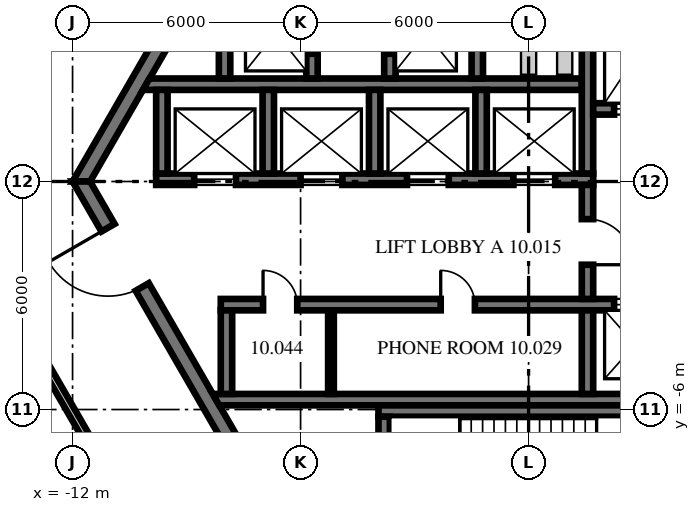
"""IFC4 building model, lengths in metres.
Left out: names, types, materials, properties, quantities, classifications, styles, units other than length and angle.
Written with IfcOpenShell. Run it as: python <this file> out.ifc"""

import sys

from ifc_helpers import new_model, si_unit, direction, frame, frame_2d, origin, place, context, subcontext, project, spatial, polyline, rectangle, outline, extrude, source, transform, mapped, element, fill, save


model = new_model("IFC4")
c1 = context("Model", 3, precision=1e-05, world=origin(), true_north=direction((0.0, 1.0)))
c2 = subcontext(c1, "Body", "Model", "MODEL_VIEW")
j1 = project(units=[si_unit("LENGTHUNIT", "METRE"), si_unit("PLANEANGLEUNIT", "RADIAN")], contexts=[c1])
p1 = place(None, origin())
s1 = spatial("IfcSite", under=j1, at=p1, CompositionType="ELEMENT")
p2 = place(p1, origin())
s2 = spatial("IfcBuilding", under=s1, at=p2, CompositionType="ELEMENT")
p3 = place(p2, frame((0.0, 0.0, 46.1)))
s3 = spatial("IfcBuildingStorey", under=s2, at=p3, CompositionType="ELEMENT", Elevation=46.1)
m1 = source(origin(), c2, "Body", "SweptSolid", [
    extrude(outline(polyline([(-0.115, -0.2), (11.885, -0.2), (11.654, 0.2), (0.115, 0.2), (-0.115, -0.2)])), origin(), (0.0, 0.0, 1.0), 4.1),
])
p4 = place(p3, frame((-5.885, 10.192, 0.0), z_axis=(0.0, 0.0, 1.0), x_axis=(-0.499996592174, -0.866027371285, 0.0)))
e1 = element("IfcWall", 1, at=p4, inside=s3, PredefinedType="SHEAR", context=c2, shape_type="MappedRepresentation", body=[
    mapped(m1, transform((0.0, 0.0, 0.0), scale=1.0)),
])
p5 = place(p4, frame((3.185, 0.0, 0.0)))
e2 = element("IfcOpeningElement", 2, at=p5, cuts=e1, PredefinedType="OPENING", context=c2, shape_type="SweptSolid", body=[
    extrude(rectangle(XDim=1.2, YDim=2.1, at=frame_2d((0.6, 1.05))), frame((0.0, 0.21, 0.0), z_axis=(0.0, -1.0, 0.0), x_axis=(1.0, 0.0, 0.0)), (0.0, 0.0, 1.0), 0.42),
])
p6 = place(p3, frame((-11.769, 0.0, 0.0), z_axis=(0.0, 0.0, 1.0), x_axis=(0.499996592174, -0.866027371285, 0.0)))
e3 = element("IfcWall", 3, at=p6, inside=s3, PredefinedType="SHEAR", context=c2, shape_type="MappedRepresentation", body=[
    mapped(m1, transform((0.0, 0.0, 0.0), scale=1.0)),
])
p7 = place(p6, frame((1.405, 0.0, 0.0)))
e4 = element("IfcOpeningElement", 4, at=p7, cuts=e3, PredefinedType="OPENING", context=c2, shape_type="SweptSolid", body=[
    extrude(rectangle(XDim=1.8, YDim=2.1, at=frame_2d((0.9, 1.05))), frame((0.0, 0.21, 0.0), z_axis=(0.0, -1.0, 0.0), x_axis=(1.0, 0.0, 0.0)), (0.0, 0.0, 1.0), 0.42),
])
p8 = place(p6, frame((7.915, 0.0, 0.0)))
e5 = element("IfcOpeningElement", 5, at=p8, cuts=e3, PredefinedType="OPENING", context=c2, shape_type="SweptSolid", body=[
    extrude(rectangle(XDim=1.2, YDim=2.1, at=frame_2d((0.6, 1.05))), frame((0.0, 0.21, 0.0), z_axis=(0.0, -1.0, 0.0), x_axis=(1.0, 0.0, 0.0)), (0.0, 0.0, 1.0), 0.42),
])
m2 = source(origin(), c2, "Body", "SweptSolid", [
    extrude(rectangle(XDim=11.5, YDim=0.3, at=frame_2d((5.75, 0.0))), origin(), (0.0, 0.0, 1.0), 4.1),
])
p9 = place(p3, frame((-9.8, 0.06, 0.0), z_axis=(0.0, 0.0, 1.0), x_axis=(1.0, 0.0, 0.0)))
e6 = element("IfcWall", 6, at=p9, inside=s3, PredefinedType="SHEAR", context=c2, shape_type="MappedRepresentation", body=[
    mapped(m2, transform((0.0, 0.0, 0.0), scale=1.0)),
])
p10 = place(p9, frame((1.0, 0.0, 0.0)))
e7 = element("IfcOpeningElement", 7, at=p10, cuts=e6, PredefinedType="OPENING", context=c2, shape_type="SweptSolid", body=[
    extrude(rectangle(XDim=1.1, YDim=2.1, at=frame_2d((0.55, 1.05))), frame((0.0, 0.16, 0.0), z_axis=(0.0, -1.0, 0.0), x_axis=(1.0, 0.0, 0.0)), (0.0, 0.0, 1.0), 0.32),
])
p11 = place(p9, frame((3.8, 0.0, 0.0)))
e8 = element("IfcOpeningElement", 8, at=p11, cuts=e6, PredefinedType="OPENING", context=c2, shape_type="SweptSolid", body=[
    extrude(rectangle(XDim=1.1, YDim=2.1, at=frame_2d((0.55, 1.05))), frame((0.0, 0.16, 0.0), z_axis=(0.0, -1.0, 0.0), x_axis=(1.0, 0.0, 0.0)), (0.0, 0.0, 1.0), 0.32),
])
p12 = place(p9, frame((6.6, 0.0, 0.0)))
e9 = element("IfcOpeningElement", 9, at=p12, cuts=e6, PredefinedType="OPENING", context=c2, shape_type="SweptSolid", body=[
    extrude(rectangle(XDim=1.1, YDim=2.1, at=frame_2d((0.55, 1.05))), frame((0.0, 0.16, 0.0), z_axis=(0.0, -1.0, 0.0), x_axis=(1.0, 0.0, 0.0)), (0.0, 0.0, 1.0), 0.32),
])
p13 = place(p9, frame((9.4, 0.0, 0.0)))
e10 = element("IfcOpeningElement", 10, at=p13, cuts=e6, PredefinedType="OPENING", context=c2, shape_type="SweptSolid", body=[
    extrude(rectangle(XDim=1.1, YDim=2.1, at=frame_2d((0.55, 1.05))), frame((0.0, 0.16, 0.0), z_axis=(0.0, -1.0, 0.0), x_axis=(1.0, 0.0, 0.0)), (0.0, 0.0, 1.0), 0.32),
])
m3 = source(origin(), c2, "Body", "SweptSolid", [
    extrude(outline(polyline([(11.2, -0.15), (-0.349, -0.15), (-0.176, 0.15), (11.2, 0.15), (11.2, -0.15)])), origin(), (0.0, 0.0, 1.0), 4.1),
])
p14 = place(p3, frame((-9.8, 2.56, 0.0), z_axis=(0.0, 0.0, 1.0), x_axis=(1.0, 0.0, 0.0)))
e11 = element("IfcWall", 11, at=p14, inside=s3, PredefinedType="SHEAR", context=c2, shape_type="MappedRepresentation", body=[
    mapped(m3, transform((0.0, 0.0, 0.0), scale=1.0)),
])
m4 = source(origin(), c2, "Body", "SweptSolid", [
    extrude(rectangle(XDim=4.45, YDim=0.3, at=frame_2d((2.225, 0.0))), origin(), (0.0, 0.0, 1.0), 4.1),
])
p15 = place(p3, frame((1.55, 0.21, 0.0), z_axis=(0.0, 0.0, 1.0), x_axis=(0.0, 1.0, 0.0)))
e12 = element("IfcWall", 12, at=p15, inside=s3, PredefinedType="SHEAR", context=c2, shape_type="MappedRepresentation", body=[
    mapped(m4, transform((0.0, 0.0, 0.0), scale=1.0)),
])
m5 = source(origin(), c2, "Body", "SweptSolid", [
    extrude(rectangle(XDim=3.0, YDim=0.3, at=frame_2d((1.5, 0.0))), origin(), (0.0, 0.0, 1.0), 4.1),
])
p16 = place(p3, frame((1.7, 1.91, 0.0), z_axis=(0.0, 0.0, 1.0), x_axis=(1.0, 0.0, 0.0)))
e13 = element("IfcWall", 13, at=p16, inside=s3, PredefinedType="SHEAR", context=c2, shape_type="MappedRepresentation", body=[
    mapped(m5, transform((0.0, 0.0, 0.0), scale=1.0)),
])
p17 = place(p16, frame((0.55, 0.0, 0.0)))
e14 = element("IfcOpeningElement", 14, at=p17, cuts=e13, PredefinedType="OPENING", context=c2, shape_type="SweptSolid", body=[
    extrude(rectangle(XDim=1.1, YDim=2.1, at=frame_2d((0.55, 1.05))), frame((0.0, 0.16, 0.0), z_axis=(0.0, -1.0, 0.0), x_axis=(1.0, 0.0, 0.0)), (0.0, 0.0, 1.0), 0.32),
])
m6 = source(origin(), c2, "Body", "SweptSolid", [
    extrude(rectangle(XDim=12.8, YDim=0.3, at=frame_2d((6.4, 0.0))), origin(), (0.0, 0.0, 1.0), 4.1),
])
p18 = place(p3, frame((-8.1, -3.24, 0.0), z_axis=(0.0, 0.0, 1.0), x_axis=(1.0, 0.0, 0.0)))
e15 = element("IfcWall", 15, at=p18, inside=s3, PredefinedType="SHEAR", context=c2, shape_type="MappedRepresentation", body=[
    mapped(m6, transform((0.0, 0.0, 0.0), scale=1.0)),
])
p19 = place(p18, frame((1.113, 0.0, 0.0)))
e16 = element("IfcOpeningElement", 16, at=p19, cuts=e15, PredefinedType="OPENING", context=c2, shape_type="SweptSolid", body=[
    extrude(rectangle(XDim=0.9, YDim=2.1, at=frame_2d((0.45, 1.05))), frame((0.0, 0.16, 0.0), z_axis=(0.0, -1.0, 0.0), x_axis=(1.0, 0.0, 0.0)), (0.0, 0.0, 1.0), 0.32),
])
p20 = place(p18, frame((5.788, 0.0, 0.0)))
e17 = element("IfcOpeningElement", 17, at=p20, cuts=e15, PredefinedType="OPENING", context=c2, shape_type="SweptSolid", body=[
    extrude(rectangle(XDim=0.9, YDim=2.1, at=frame_2d((0.45, 1.05))), frame((0.0, 0.16, 0.0), z_axis=(0.0, -1.0, 0.0), x_axis=(1.0, 0.0, 0.0)), (0.0, 0.0, 1.0), 0.32),
])
p21 = place(p18, frame((10.35, 0.0, 0.0)))
e18 = element("IfcOpeningElement", 18, at=p21, cuts=e15, PredefinedType="OPENING", context=c2, shape_type="SweptSolid", body=[
    extrude(rectangle(XDim=1.1, YDim=2.1, at=frame_2d((0.55, 1.05))), frame((0.0, 0.16, 0.0), z_axis=(0.0, -1.0, 0.0), x_axis=(1.0, 0.0, 0.0)), (0.0, 0.0, 1.0), 0.32),
])
m7 = source(origin(), c2, "Body", "SweptSolid", [
    extrude(outline(polyline([(12.0, -0.15), (-0.04, -0.15), (-0.213, 0.15), (12.0, 0.15), (12.0, -0.15)])), origin(), (0.0, 0.0, 1.0), 4.1),
])
p22 = place(p3, frame((-8.1, -5.74, 0.0), z_axis=(0.0, 0.0, 1.0), x_axis=(1.0, 0.0, 0.0)))
e19 = element("IfcWall", 19, at=p22, inside=s3, PredefinedType="SHEAR", context=c2, shape_type="MappedRepresentation", body=[
    mapped(m7, transform((0.0, 0.0, 0.0), scale=1.0)),
])
m8 = source(origin(), c2, "Body", "SweptSolid", [
    extrude(rectangle(XDim=2.2, YDim=0.3, at=frame_2d((1.1, 0.0))), origin(), (0.0, 0.0, 1.0), 4.1),
])
p23 = place(p3, frame((-7.95, -5.59, 0.0), z_axis=(0.0, 0.0, 1.0), x_axis=(0.0, 1.0, 0.0)))
e20 = element("IfcWall", 20, at=p23, inside=s3, PredefinedType="SHEAR", context=c2, shape_type="MappedRepresentation", body=[
    mapped(m8, transform((0.0, 0.0, 0.0), scale=1.0)),
])
m9 = source(origin(), c2, "Body", "SweptSolid", [
    extrude(rectangle(XDim=2.2, YDim=0.3, at=frame_2d((1.1, 0.0))), origin(), (0.0, 0.0, 1.0), 4.1),
])
p24 = place(p3, frame((-9.65, 0.21, 0.0), z_axis=(0.0, 0.0, 1.0), x_axis=(0.0, 1.0, 0.0)))
e21 = element("IfcWall", 21, at=p24, inside=s3, PredefinedType="SHEAR", context=c2, shape_type="MappedRepresentation", body=[
    mapped(m9, transform((0.0, 0.0, 0.0), scale=1.0)),
])
p25 = place(p3, frame((1.55, -5.59, 0.0), z_axis=(0.0, 0.0, 1.0), x_axis=(0.0, 1.0, 0.0)))
e22 = element("IfcWall", 22, at=p25, inside=s3, PredefinedType="SHEAR", context=c2, shape_type="MappedRepresentation", body=[
    mapped(m8, transform((0.0, 0.0, 0.0), scale=1.0)),
])
p26 = place(p3, frame((1.55, -3.09, 0.0), z_axis=(0.0, 0.0, 1.0), x_axis=(0.0, 1.0, 0.0)))
e23 = element("IfcWall", 23, at=p26, inside=s3, PredefinedType="SHEAR", context=c2, shape_type="MappedRepresentation", body=[
    mapped(m5, transform((0.0, 0.0, 0.0), scale=1.0)),
])
p27 = place(p26, frame((0.9, 0.0, 0.0)))
e24 = element("IfcOpeningElement", 24, at=p27, cuts=e23, PredefinedType="OPENING", context=c2, shape_type="SweptSolid", body=[
    extrude(rectangle(XDim=1.2, YDim=2.1, at=frame_2d((0.6, 1.05))), frame((0.0, 0.16, 0.0), z_axis=(0.0, -1.0, 0.0), x_axis=(1.0, 0.0, 0.0)), (0.0, 0.0, 1.0), 0.32),
])
m10 = source(origin(), c2, "Body", "SweptSolid", [
    extrude(outline(polyline([(0.0, -0.15), (8.95, -0.15), (8.65, 0.15), (0.0, 0.15), (0.0, -0.15)])), origin(), (0.0, 0.0, 1.0), 4.1),
])
p28 = place(p3, frame((-3.95, -6.04, 0.0), z_axis=(0.0, 0.0, 1.0), x_axis=(1.0, 0.0, 0.0)))
e25 = element("IfcWall", 25, at=p28, inside=s3, PredefinedType="SHEAR", context=c2, shape_type="MappedRepresentation", body=[
    mapped(m10, transform((0.0, 0.0, 0.0), scale=1.0)),
])
m11 = source(origin(), c2, "Body", "SweptSolid", [
    extrude(outline(polyline([(3.8, -0.15), (-0.004, -0.15), (-0.004, 0.15), (3.8, 0.15), (3.8, -0.15)])), origin(), (0.0, 0.0, 1.0), 4.1),
])
p29 = place(p3, frame((-3.8, -9.99, 0.0), z_axis=(0.0, 0.0, 1.0), x_axis=(0.0, 1.0, 0.0)))
e26 = element("IfcWall", 26, at=p29, inside=s3, PredefinedType="SHEAR", context=c2, shape_type="MappedRepresentation", body=[
    mapped(m11, transform((0.0, 0.0, 0.0), scale=1.0)),
])
m12 = source(origin(), c2, "Body", "SweptSolid", [
    extrude(rectangle(XDim=2.4, YDim=0.3, at=frame_2d((1.2, 0.0))), origin(), (0.0, 0.0, 1.0), 4.1),
])
p30 = place(p3, frame((-8.0, 2.71, 0.0), z_axis=(0.0, 0.0, 1.0), x_axis=(0.0, 1.0, 0.0)))
e27 = element("IfcWall", 27, at=p30, inside=s3, PredefinedType="SHEAR", context=c2, shape_type="MappedRepresentation", body=[
    mapped(m12, transform((0.0, 0.0, 0.0), scale=1.0)),
])
p31 = place(p3, frame((-5.7, 2.71, 0.0), z_axis=(0.0, 0.0, 1.0), x_axis=(0.0, 1.0, 0.0)))
e28 = element("IfcWall", 28, at=p31, inside=s3, PredefinedType="SHEAR", context=c2, shape_type="MappedRepresentation", body=[
    mapped(m12, transform((0.0, 0.0, 0.0), scale=1.0)),
])
p32 = place(p31, frame((0.65, 0.0, 0.0)))
e29 = element("IfcOpeningElement", 29, at=p32, cuts=e28, PredefinedType="OPENING", context=c2, shape_type="SweptSolid", body=[
    extrude(rectangle(XDim=1.1, YDim=2.1, at=frame_2d((0.55, 1.05))), frame((0.0, 0.16, 0.0), z_axis=(0.0, -1.0, 0.0), x_axis=(1.0, 0.0, 0.0)), (0.0, 0.0, 1.0), 0.32),
])
p33 = place(p3, frame((-3.65, 2.71, 0.0), z_axis=(0.0, 0.0, 1.0), x_axis=(0.0, 1.0, 0.0)))
e30 = element("IfcWall", 30, at=p33, inside=s3, PredefinedType="SHEAR", context=c2, shape_type="MappedRepresentation", body=[
    mapped(m12, transform((0.0, 0.0, 0.0), scale=1.0)),
])
p34 = place(p33, frame((0.65, 0.0, 0.0)))
e31 = element("IfcOpeningElement", 31, at=p34, cuts=e30, PredefinedType="OPENING", context=c2, shape_type="SweptSolid", body=[
    extrude(rectangle(XDim=1.1, YDim=2.1, at=frame_2d((0.55, 1.05))), frame((0.0, 0.16, 0.0), z_axis=(0.0, -1.0, 0.0), x_axis=(1.0, 0.0, 0.0)), (0.0, 0.0, 1.0), 0.32),
])
p35 = place(p3, frame((-1.35, 2.71, 0.0), z_axis=(0.0, 0.0, 1.0), x_axis=(0.0, 1.0, 0.0)))
e32 = element("IfcWall", 32, at=p35, inside=s3, PredefinedType="SHEAR", context=c2, shape_type="MappedRepresentation", body=[
    mapped(m12, transform((0.0, 0.0, 0.0), scale=1.0)),
])
for number, where, z_axis, x_axis in (
    (33, (-6.85, 0.21, 0.0), (0.0, 0.0, 1.0), (0.0, 1.0, 0.0)),
    (34, (-4.05, 0.21, 0.0), (0.0, 0.0, 1.0), (0.0, 1.0, 0.0)),
    (35, (-1.25, 0.21, 0.0), (0.0, 0.0, 1.0), (0.0, 1.0, 0.0)),
):
    element("IfcWall", number, at=place(p3, frame(where, z_axis=z_axis, x_axis=x_axis)), inside=s3, PredefinedType="SHEAR", context=c2, shape_type="MappedRepresentation", body=[
        mapped(m9, transform((0.0, 0.0, 0.0), scale=1.0)),
    ])
m13 = source(origin(), c2, "Body", "SweptSolid", [
    extrude(rectangle(XDim=2.2, YDim=0.15, at=frame_2d((1.1, 0.0))), origin(), (0.0, 0.0, 1.0), 4.1),
])
p36 = place(p3, frame((-5.2, -5.59, 0.0), z_axis=(0.0, 0.0, 1.0), x_axis=(0.0, 1.0, 0.0)))
e36 = element("IfcWall", 36, at=p36, inside=s3, PredefinedType="PARTITIONING", context=c2, shape_type="MappedRepresentation", body=[
    mapped(m13, transform((0.0, 0.0, 0.0), scale=1.0)),
])
p37 = place(p3, frame((-12.827, -4.668, 0.0), z_axis=(0.0, 0.0, 1.0), x_axis=(0.500014404596, -0.866017087127, 0.0)))
e37 = element("IfcWall", 37, at=p37, inside=s3, PredefinedType="PARTITIONING", context=c2, shape_type="SweptSolid", body=[
    extrude(rectangle(XDim=10.062, YDim=0.2, at=frame_2d((5.031, 0.0))), origin(), (0.0, 0.0, 1.0), 4.1),
])
p38 = place(p37, frame((4.493, 0.0, 0.0)))
e38 = element("IfcOpeningElement", 38, at=p38, cuts=e37, PredefinedType="OPENING", context=c2, shape_type="SweptSolid", body=[
    extrude(rectangle(XDim=0.9, YDim=2.1, at=frame_2d((0.45, 1.05))), frame((0.0, 0.11, 0.0), z_axis=(0.0, -1.0, 0.0), x_axis=(1.0, 0.0, 0.0)), (0.0, 0.0, 1.0), 0.22),
])
p39 = place(p7, frame((1.8, 0.0, 0.0), z_axis=(0.0, 0.0, 1.0), x_axis=(-1.0, 0.0, 0.0)))
e39 = element("IfcDoor", 39, at=p39, inside=s3, OperationType="DOUBLE_DOOR_DOUBLE_SWING", PredefinedType="DOOR", context=c2, shape_type="SweptSolid", body=[
    extrude(rectangle(XDim=1.8, YDim=2.1, at=frame_2d((0.9, 1.05))), frame((0.0, 0.025, 0.0), z_axis=(0.0, -1.0, 0.0), x_axis=(1.0, 0.0, 0.0)), (0.0, 0.0, 1.0), 0.05),
])
fill(e4, e39)
p40 = place(p27, frame((1.2, 0.0, 0.0), z_axis=(0.0, 0.0, 1.0), x_axis=(-1.0, 0.0, 0.0)))
e40 = element("IfcDoor", 40, at=p40, inside=s3, OperationType="SINGLE_SWING_RIGHT", PredefinedType="DOOR", context=c2, shape_type="SweptSolid", body=[
    extrude(rectangle(XDim=1.2, YDim=2.1, at=frame_2d((0.6, 1.05))), frame((0.0, 0.025, 0.0), z_axis=(0.0, -1.0, 0.0), x_axis=(1.0, 0.0, 0.0)), (0.0, 0.0, 1.0), 0.05),
])
fill(e24, e40)
p41 = place(p19, origin())
e41 = element("IfcDoor", 41, at=p41, inside=s3, OperationType="SINGLE_SWING_LEFT", PredefinedType="DOOR", context=c2, shape_type="SweptSolid", body=[
    extrude(rectangle(XDim=0.9, YDim=2.1, at=frame_2d((0.45, 1.05))), frame((0.0, 0.025, 0.0), z_axis=(0.0, -1.0, 0.0), x_axis=(1.0, 0.0, 0.0)), (0.0, 0.0, 1.0), 0.05),
])
fill(e16, e41)
p42 = place(p20, origin())
e42 = element("IfcDoor", 42, at=p42, inside=s3, OperationType="SINGLE_SWING_LEFT", PredefinedType="DOOR", context=c2, shape_type="SweptSolid", body=[
    extrude(rectangle(XDim=0.9, YDim=2.1, at=frame_2d((0.45, 1.05))), frame((0.0, 0.025, 0.0), z_axis=(0.0, -1.0, 0.0), x_axis=(1.0, 0.0, 0.0)), (0.0, 0.0, 1.0), 0.05),
])
fill(e17, e42)
p43 = place(p10, origin())
e43 = element("IfcDoor", 43, at=p43, inside=s3, OperationType="DOUBLE_DOOR_SLIDING", PredefinedType="DOOR", context=c2, shape_type="SweptSolid", body=[
    extrude(rectangle(XDim=1.1, YDim=2.1, at=frame_2d((0.55, 1.05))), frame((0.0, 0.025, 0.0), z_axis=(0.0, -1.0, 0.0), x_axis=(1.0, 0.0, 0.0)), (0.0, 0.0, 1.0), 0.05),
])
fill(e7, e43)
p44 = place(p11, origin())
e44 = element("IfcDoor", 44, at=p44, inside=s3, OperationType="DOUBLE_DOOR_SLIDING", PredefinedType="DOOR", context=c2, shape_type="SweptSolid", body=[
    extrude(rectangle(XDim=1.1, YDim=2.1, at=frame_2d((0.55, 1.05))), frame((0.0, 0.025, 0.0), z_axis=(0.0, -1.0, 0.0), x_axis=(1.0, 0.0, 0.0)), (0.0, 0.0, 1.0), 0.05),
])
fill(e8, e44)
p45 = place(p12, origin())
e45 = element("IfcDoor", 45, at=p45, inside=s3, OperationType="DOUBLE_DOOR_SLIDING", PredefinedType="DOOR", context=c2, shape_type="SweptSolid", body=[
    extrude(rectangle(XDim=1.1, YDim=2.1, at=frame_2d((0.55, 1.05))), frame((0.0, 0.025, 0.0), z_axis=(0.0, -1.0, 0.0), x_axis=(1.0, 0.0, 0.0)), (0.0, 0.0, 1.0), 0.05),
])
fill(e9, e45)
p46 = place(p13, origin())
e46 = element("IfcDoor", 46, at=p46, inside=s3, OperationType="DOUBLE_DOOR_SLIDING", PredefinedType="DOOR", context=c2, shape_type="SweptSolid", body=[
    extrude(rectangle(XDim=1.1, YDim=2.1, at=frame_2d((0.55, 1.05))), frame((0.0, 0.025, 0.0), z_axis=(0.0, -1.0, 0.0), x_axis=(1.0, 0.0, 0.0)), (0.0, 0.0, 1.0), 0.05),
])
fill(e10, e46)
p47 = place(p17, origin())
e47 = element("IfcDoor", 47, at=p47, inside=s3, OperationType="DOUBLE_DOOR_SLIDING", PredefinedType="DOOR", context=c2, shape_type="SweptSolid", body=[
    extrude(rectangle(XDim=1.1, YDim=2.1, at=frame_2d((0.55, 1.05))), frame((0.0, 0.025, 0.0), z_axis=(0.0, -1.0, 0.0), x_axis=(1.0, 0.0, 0.0)), (0.0, 0.0, 1.0), 0.05),
])
fill(e14, e47)
p48 = place(p21, origin())
e48 = element("IfcDoor", 48, at=p48, inside=s3, OperationType="DOUBLE_DOOR_SLIDING", PredefinedType="DOOR", context=c2, shape_type="SweptSolid", body=[
    extrude(rectangle(XDim=1.1, YDim=2.1, at=frame_2d((0.55, 1.05))), frame((0.0, 0.025, 0.0), z_axis=(0.0, -1.0, 0.0), x_axis=(1.0, 0.0, 0.0)), (0.0, 0.0, 1.0), 0.05),
])
fill(e18, e48)
p49 = place(p32, origin())
e49 = element("IfcDoor", 49, at=p49, inside=s3, OperationType="DOUBLE_DOOR_SLIDING", PredefinedType="DOOR", context=c2, shape_type="SweptSolid", body=[
    extrude(rectangle(XDim=1.1, YDim=2.1, at=frame_2d((0.55, 1.05))), frame((0.0, 0.025, 0.0), z_axis=(0.0, -1.0, 0.0), x_axis=(1.0, 0.0, 0.0)), (0.0, 0.0, 1.0), 0.05),
])
fill(e29, e49)
p50 = place(p34, origin())
e50 = element("IfcDoor", 50, at=p50, inside=s3, OperationType="DOUBLE_DOOR_SLIDING", PredefinedType="DOOR", context=c2, shape_type="SweptSolid", body=[
    extrude(rectangle(XDim=1.1, YDim=2.1, at=frame_2d((0.55, 1.05))), frame((0.0, 0.025, 0.0), z_axis=(0.0, -1.0, 0.0), x_axis=(1.0, 0.0, 0.0)), (0.0, 0.0, 1.0), 0.05),
])
fill(e31, e50)
save(model, sys.argv[1])
